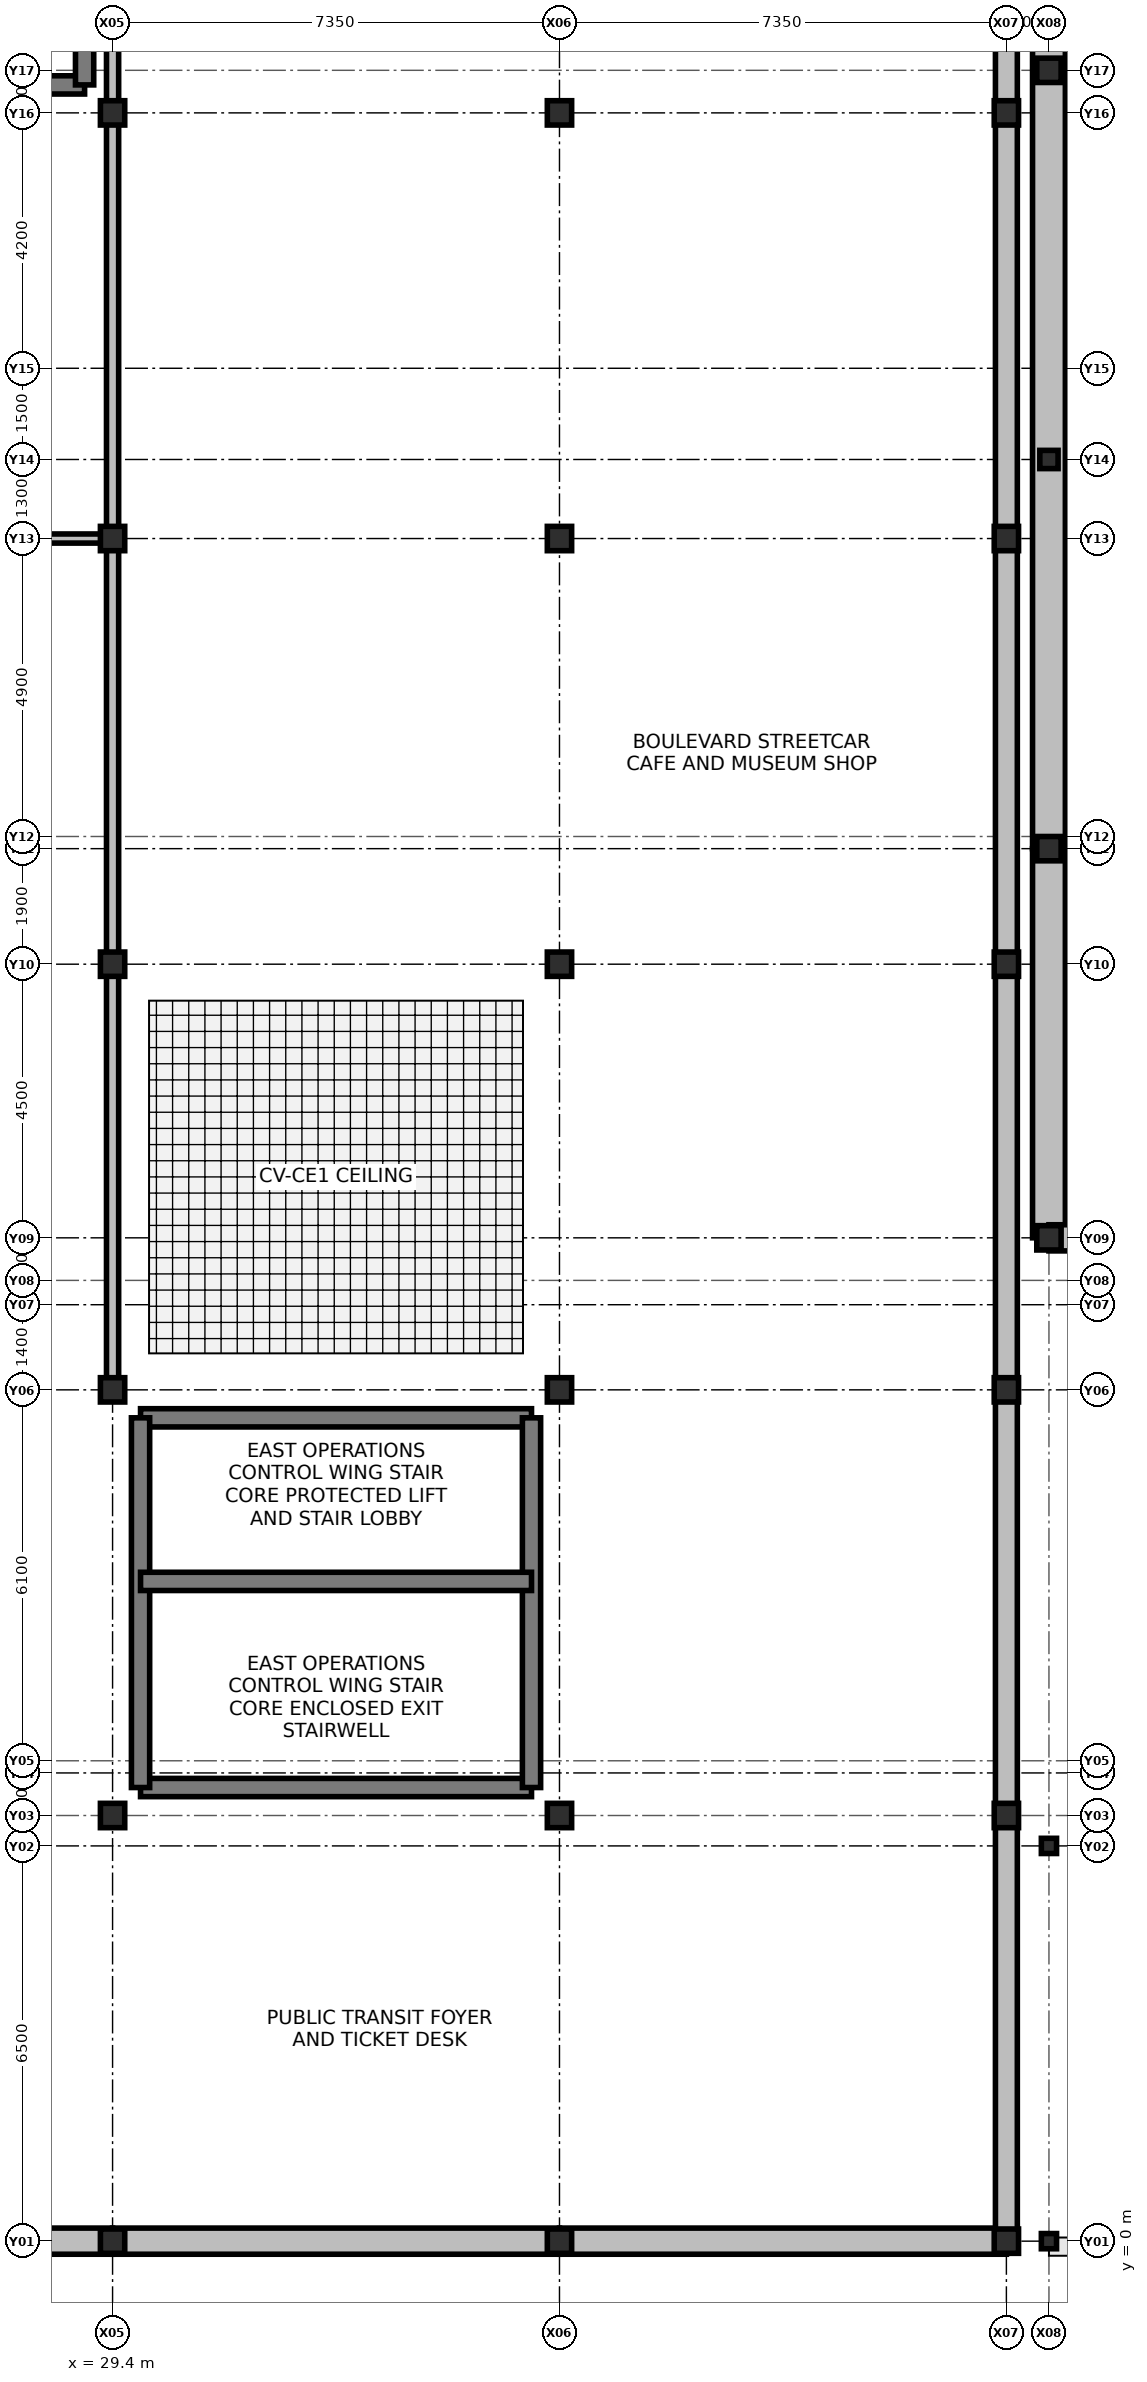
"""IFC4 building model, lengths in metres.
Left out: names, types, materials, properties, quantities, classifications, styles, units other than length and angle.
Written with IfcOpenShell. Run it as: python <this file> out.ifc"""

import sys

from ifc_helpers import new_model, si_unit, direction, frame, frame_2d, origin, origin_2d, place, context, subcontext, project, spatial, rectangle, hollow_rectangle, i_section, extrude, element, fill, save


model = new_model("IFC4")
c1 = context("Model", 3, precision=1e-05, world=origin(), true_north=direction((0.0, 1.0)))
c2 = subcontext(c1, "Body", "Model", "MODEL_VIEW")
j1 = project(units=[si_unit("LENGTHUNIT", "METRE"), si_unit("PLANEANGLEUNIT", "RADIAN")], contexts=[c1])
p1 = place(None, origin())
s1 = spatial("IfcSite", under=j1, at=p1, CompositionType="ELEMENT")
p2 = place(p1, origin())
s2 = spatial("IfcBuilding", under=s1, at=p2, CompositionType="ELEMENT")
p3 = place(p2, origin())
s3 = spatial("IfcBuildingStorey", under=s2, at=p3, CompositionType="ELEMENT", Elevation=0.0)
for number, where, z_axis, x_axis in (
    (1, (44.8, 16.5, -0.35), (0.0, 0.0, 1.0), (1.0, 0.0, 0.0)),
    (2, (44.8, 22.9, -0.35), (0.0, 0.0, 1.0), (1.0, 0.0, 0.0)),
):
    element("IfcColumn", number, at=place(p3, frame(where, z_axis=z_axis, x_axis=x_axis)), inside=s3, PredefinedType="COLUMN", context=c2, shape_type="SweptSolid", body=[
        extrude(i_section(OverallWidth=0.4, OverallDepth=0.4, WebThickness=0.013, FlangeThickness=0.021, at=origin_2d()), origin(), (0.0, 0.0, 1.0), 6.35),
    ])
p4 = place(p3, frame((44.8, 29.3, -0.35), z_axis=(0.0, 0.0, 1.0), x_axis=(1.0, 0.0, 0.0)))
e3 = element("IfcColumn", 3, at=p4, inside=s3, PredefinedType="COLUMN", context=c2, shape_type="SweptSolid", body=[
    extrude(i_section(OverallWidth=0.3, OverallDepth=0.3, WebThickness=0.01, FlangeThickness=0.015, at=origin_2d()), origin(), (0.0, 0.0, 1.0), 6.35),
])
for number, where, z_axis, x_axis in (
    (4, (44.8, 35.7, -0.35), (0.0, 0.0, 1.0), (1.0, 0.0, 0.0)),
    (5, (29.4, 0.0, -0.35), (0.0, 0.0, 1.0), (1.0, 0.0, 0.0)),
    (6, (29.4, 7.0, -0.35), (0.0, 0.0, 1.0), (1.0, 0.0, 0.0)),
    (7, (29.4, 14.0, -0.35), (0.0, 0.0, 1.0), (1.0, 0.0, 0.0)),
    (8, (29.4, 21.0, -0.35), (0.0, 0.0, 1.0), (1.0, 0.0, 0.0)),
    (9, (29.4, 28.0, -0.35), (0.0, 0.0, 1.0), (1.0, 0.0, 0.0)),
    (10, (29.4, 35.0, -0.35), (0.0, 0.0, 1.0), (1.0, 0.0, 0.0)),
    (11, (36.75, 0.0, -0.35), (0.0, 0.0, 1.0), (1.0, 0.0, 0.0)),
    (12, (36.75, 7.0, -0.35), (0.0, 0.0, 1.0), (1.0, 0.0, 0.0)),
    (13, (36.75, 14.0, -0.35), (0.0, 0.0, 1.0), (1.0, 0.0, 0.0)),
    (14, (36.75, 21.0, -0.35), (0.0, 0.0, 1.0), (1.0, 0.0, 0.0)),
    (15, (36.75, 28.0, -0.35), (0.0, 0.0, 1.0), (1.0, 0.0, 0.0)),
    (16, (36.75, 35.0, -0.35), (0.0, 0.0, 1.0), (1.0, 0.0, 0.0)),
    (17, (44.1, 0.0, -0.35), (0.0, 0.0, 1.0), (1.0, 0.0, 0.0)),
    (18, (44.1, 7.0, -0.35), (0.0, 0.0, 1.0), (1.0, 0.0, 0.0)),
    (19, (44.1, 14.0, -0.35), (0.0, 0.0, 1.0), (1.0, 0.0, 0.0)),
    (20, (44.1, 21.0, -0.35), (0.0, 0.0, 1.0), (1.0, 0.0, 0.0)),
    (21, (44.1, 28.0, -0.35), (0.0, 0.0, 1.0), (1.0, 0.0, 0.0)),
    (22, (44.1, 35.0, -0.35), (0.0, 0.0, 1.0), (1.0, 0.0, 0.0)),
):
    element("IfcColumn", number, at=place(p3, frame(where, z_axis=z_axis, x_axis=x_axis)), inside=s3, PredefinedType="COLUMN", context=c2, shape_type="SweptSolid", body=[
        extrude(i_section(OverallWidth=0.4, OverallDepth=0.4, WebThickness=0.013, FlangeThickness=0.021, at=origin_2d()), origin(), (0.0, 0.0, 1.0), 6.35),
    ])
p5 = place(p3, frame((44.8, 0.0, -0.35), z_axis=(0.0, 0.0, 1.0), x_axis=(1.0, 0.0, 0.0)))
e23 = element("IfcColumn", 23, at=p5, inside=s3, PredefinedType="COLUMN", context=c2, shape_type="SweptSolid", body=[
    extrude(hollow_rectangle(XDim=0.25, YDim=0.25, WallThickness=0.009, at=origin_2d()), origin(), (0.0, 0.0, 1.0), 6.125),
])
p6 = place(p3, frame((44.8, 6.5, -0.35), z_axis=(0.0, 0.0, 1.0), x_axis=(1.0, 0.0, 0.0)))
e24 = element("IfcColumn", 24, at=p6, inside=s3, PredefinedType="COLUMN", context=c2, shape_type="SweptSolid", body=[
    extrude(hollow_rectangle(XDim=0.25, YDim=0.25, WallThickness=0.009, at=origin_2d()), origin(), (0.0, 0.0, 1.0), 6.748),
])
p7 = place(p3, frame((44.8, 22.9, 0.0), z_axis=(0.0, 0.0, 1.0), x_axis=(0.0, 1.0, 0.0)))
e25 = element("IfcWall", 25, at=p7, inside=s3, PredefinedType="SOLIDWALL", context=c2, shape_type="SweptSolid", body=[
    extrude(rectangle(XDim=32.0, YDim=0.54, at=frame_2d((16.0, 0.0))), origin(), (0.0, 0.0, 1.0), 5.14),
])
p8 = place(p7, frame((1.3, 0.0, 0.0)))
e26 = element("IfcOpeningElement", 26, at=p8, cuts=e25, PredefinedType="OPENING", context=c2, shape_type="SweptSolid", body=[
    extrude(rectangle(XDim=3.8, YDim=4.4, at=frame_2d((1.9, 2.2))), frame((0.0, 0.28, 0.0), z_axis=(0.0, -1.0, 0.0), x_axis=(1.0, 0.0, 0.0)), (0.0, 0.0, 1.0), 0.56),
])
p9 = place(p7, frame((7.7, 0.0, 0.0)))
e27 = element("IfcOpeningElement", 27, at=p9, cuts=e25, PredefinedType="OPENING", context=c2, shape_type="SweptSolid", body=[
    extrude(rectangle(XDim=3.8, YDim=4.4, at=frame_2d((1.9, 2.2))), frame((0.0, 0.28, 0.0), z_axis=(0.0, -1.0, 0.0), x_axis=(1.0, 0.0, 0.0)), (0.0, 0.0, 1.0), 0.56),
])
p10 = place(p7, frame((14.1, 0.0, 0.0)))
e28 = element("IfcOpeningElement", 28, at=p10, cuts=e25, PredefinedType="OPENING", context=c2, shape_type="SweptSolid", body=[
    extrude(rectangle(XDim=3.8, YDim=4.4, at=frame_2d((1.9, 2.2))), frame((0.0, 0.28, 0.0), z_axis=(0.0, -1.0, 0.0), x_axis=(1.0, 0.0, 0.0)), (0.0, 0.0, 1.0), 0.56),
])
p11 = place(p7, frame((20.5, 0.0, 0.0)))
e29 = element("IfcOpeningElement", 29, at=p11, cuts=e25, PredefinedType="OPENING", context=c2, shape_type="SweptSolid", body=[
    extrude(rectangle(XDim=3.8, YDim=4.4, at=frame_2d((1.9, 2.2))), frame((0.0, 0.28, 0.0), z_axis=(0.0, -1.0, 0.0), x_axis=(1.0, 0.0, 0.0)), (0.0, 0.0, 1.0), 0.56),
])
p12 = place(p7, frame((26.9, 0.0, 0.0)))
e30 = element("IfcOpeningElement", 30, at=p12, cuts=e25, PredefinedType="OPENING", context=c2, shape_type="SweptSolid", body=[
    extrude(rectangle(XDim=3.8, YDim=4.4, at=frame_2d((1.9, 2.2))), frame((0.0, 0.28, 0.0), z_axis=(0.0, -1.0, 0.0), x_axis=(1.0, 0.0, 0.0)), (0.0, 0.0, 1.0), 0.56),
])
p13 = place(p3, frame((44.8, 16.5, 0.0), z_axis=(0.0, 0.0, 1.0), x_axis=(0.0, 1.0, 0.0)))
e31 = element("IfcWall", 31, at=p13, inside=s3, PredefinedType="SOLIDWALL", context=c2, shape_type="SweptSolid", body=[
    extrude(rectangle(XDim=6.4, YDim=0.54, at=frame_2d((3.2, 0.0))), origin(), (0.0, 0.0, 1.0), 5.14),
])
p14 = place(p3, frame((44.8, 16.5, 0.0), z_axis=(0.0, 0.0, 1.0), x_axis=(1.0, 0.0, 0.0)))
e32 = element("IfcWall", 32, at=p14, inside=s3, PredefinedType="SOLIDWALL", context=c2, shape_type="SweptSolid", body=[
    extrude(rectangle(XDim=8.4, YDim=0.43, at=frame_2d((4.2, 0.0))), origin(), (0.0, 0.0, 1.0), 5.14),
])
p15 = place(p14, frame((3.3, 0.0, 0.0)))
e33 = element("IfcOpeningElement", 33, at=p15, cuts=e32, PredefinedType="OPENING", context=c2, shape_type="SweptSolid", body=[
    extrude(rectangle(XDim=1.8, YDim=2.4, at=frame_2d((0.9, 1.2))), frame((0.0, 0.225, 0.0), z_axis=(0.0, -1.0, 0.0), x_axis=(1.0, 0.0, 0.0)), (0.0, 0.0, 1.0), 0.45),
])
p16 = place(p3, frame((22.05, 0.0, 0.0), z_axis=(0.0, 0.0, 1.0), x_axis=(1.0, 0.0, 0.0)))
e34 = element("IfcWall", 34, at=p16, inside=s3, PredefinedType="SOLIDWALL", context=c2, shape_type="SweptSolid", body=[
    extrude(rectangle(XDim=7.35, YDim=0.43, at=frame_2d((3.675, 0.0))), origin(), (0.0, 0.0, 1.0), 5.15),
])
p17 = place(p3, frame((29.4, 0.0, 0.0), z_axis=(0.0, 0.0, 1.0), x_axis=(1.0, 0.0, 0.0)))
e35 = element("IfcWall", 35, at=p17, inside=s3, PredefinedType="SOLIDWALL", context=c2, shape_type="SweptSolid", body=[
    extrude(rectangle(XDim=7.35, YDim=0.43, at=frame_2d((3.675, 0.0))), origin(), (0.0, 0.0, 1.0), 5.15),
])
p18 = place(p17, frame((2.75, 0.0, 0.0)))
e36 = element("IfcOpeningElement", 36, at=p18, cuts=e35, PredefinedType="OPENING", context=c2, shape_type="SweptSolid", body=[
    extrude(rectangle(XDim=1.8, YDim=2.4, at=frame_2d((0.9, 1.2))), frame((0.0, 0.225, 0.0), z_axis=(0.0, -1.0, 0.0), x_axis=(1.0, 0.0, 0.0)), (0.0, 0.0, 1.0), 0.45),
])
p19 = place(p3, frame((36.75, 0.0, 0.0), z_axis=(0.0, 0.0, 1.0), x_axis=(1.0, 0.0, 0.0)))
e37 = element("IfcWall", 37, at=p19, inside=s3, PredefinedType="SOLIDWALL", context=c2, shape_type="SweptSolid", body=[
    extrude(rectangle(XDim=7.35, YDim=0.43, at=frame_2d((3.675, 0.0))), origin(), (0.0, 0.0, 1.0), 5.15),
])
for number, where, z_axis, x_axis in (
    (38, (44.1, 0.0, 0.0), (0.0, 0.0, 1.0), (0.0, 1.0, 0.0)),
    (39, (44.1, 7.0, 0.0), (0.0, 0.0, 1.0), (0.0, 1.0, 0.0)),
    (40, (44.1, 14.0, 0.0), (0.0, 0.0, 1.0), (0.0, 1.0, 0.0)),
    (41, (44.1, 21.0, 0.0), (0.0, 0.0, 1.0), (0.0, 1.0, 0.0)),
    (42, (44.1, 28.0, 0.0), (0.0, 0.0, 1.0), (0.0, 1.0, 0.0)),
    (43, (44.1, 35.0, 0.0), (0.0, 0.0, 1.0), (0.0, 1.0, 0.0)),
):
    element("IfcWall", number, at=place(p3, frame(where, z_axis=z_axis, x_axis=x_axis)), inside=s3, PredefinedType="SOLIDWALL", context=c2, shape_type="SweptSolid", body=[
        extrude(rectangle(XDim=7.0, YDim=0.36, at=frame_2d((3.5, 0.0))), origin(), (0.0, 0.0, 1.0), 1.2),
    ])
p20 = place(p3, frame((22.51, 35.46, -0.35), z_axis=(0.0, 0.0, 1.0), x_axis=(1.0, 0.0, 0.0)))
e44 = element("IfcWall", 44, at=p20, inside=s3, PredefinedType="SHEAR", context=c2, shape_type="SweptSolid", body=[
    extrude(rectangle(XDim=6.43, YDim=0.3, at=frame_2d((3.215, 0.0))), origin(), (0.0, 0.0, 1.0), 6.07),
])
p21 = place(p3, frame((28.94, 35.46, -0.35), z_axis=(0.0, 0.0, 1.0), x_axis=(0.0, 1.0, 0.0)))
e45 = element("IfcWall", 45, at=p21, inside=s3, PredefinedType="SHEAR", context=c2, shape_type="SweptSolid", body=[
    extrude(rectangle(XDim=6.08, YDim=0.3, at=frame_2d((3.04, 0.0))), origin(), (0.0, 0.0, 1.0), 6.07),
])
p22 = place(p3, frame((29.86, 7.46, -0.35), z_axis=(0.0, 0.0, 1.0), x_axis=(1.0, 0.0, 0.0)))
e46 = element("IfcWall", 46, at=p22, inside=s3, PredefinedType="SHEAR", context=c2, shape_type="SweptSolid", body=[
    extrude(rectangle(XDim=6.43, YDim=0.3, at=frame_2d((3.215, 0.0))), origin(), (0.0, 0.0, 1.0), 6.07),
])
p23 = place(p3, frame((29.86, 13.54, -0.35), z_axis=(0.0, 0.0, 1.0), x_axis=(1.0, 0.0, 0.0)))
e47 = element("IfcWall", 47, at=p23, inside=s3, PredefinedType="SHEAR", context=c2, shape_type="SweptSolid", body=[
    extrude(rectangle(XDim=6.43, YDim=0.3, at=frame_2d((3.215, 0.0))), origin(), (0.0, 0.0, 1.0), 6.07),
])
p24 = place(p23, frame((0.55, 0.0, 0.35)))
e48 = element("IfcOpeningElement", 48, at=p24, cuts=e47, PredefinedType="OPENING", context=c2, shape_type="SweptSolid", body=[
    extrude(rectangle(XDim=1.5, YDim=2.2, at=frame_2d((0.75, 1.1))), frame((0.0, 0.16, 0.0), z_axis=(0.0, -1.0, 0.0), x_axis=(1.0, 0.0, 0.0)), (0.0, 0.0, 1.0), 0.32),
])
for number, where, z_axis, x_axis in (
    (49, (29.86, 7.46, -0.35), (0.0, 0.0, 1.0), (0.0, 1.0, 0.0)),
    (50, (36.29, 7.46, -0.35), (0.0, 0.0, 1.0), (0.0, 1.0, 0.0)),
):
    element("IfcWall", number, at=place(p3, frame(where, z_axis=z_axis, x_axis=x_axis)), inside=s3, PredefinedType="SHEAR", context=c2, shape_type="SweptSolid", body=[
        extrude(rectangle(XDim=6.08, YDim=0.3, at=frame_2d((3.04, 0.0))), origin(), (0.0, 0.0, 1.0), 6.07),
    ])
p25 = place(p3, frame((29.86, 10.85, -0.35), z_axis=(0.0, 0.0, 1.0), x_axis=(1.0, 0.0, 0.0)))
e51 = element("IfcWall", 51, at=p25, inside=s3, PredefinedType="SHEAR", context=c2, shape_type="SweptSolid", body=[
    extrude(rectangle(XDim=6.43, YDim=0.3, at=frame_2d((3.215, 0.0))), origin(), (0.0, 0.0, 1.0), 6.07),
])
p26 = place(p25, frame((0.185, 0.0, 0.35)))
e52 = element("IfcOpeningElement", 52, at=p26, cuts=e51, PredefinedType="OPENING", context=c2, shape_type="SweptSolid", body=[
    extrude(rectangle(XDim=1.05, YDim=2.15, at=frame_2d((0.525, 1.075))), frame((0.0, 0.16, 0.0), z_axis=(0.0, -1.0, 0.0), x_axis=(1.0, 0.0, 0.0)), (0.0, 0.0, 1.0), 0.32),
])
p27 = place(p3, frame((29.4, 14.0, 0.0), z_axis=(0.0, 0.0, 1.0), x_axis=(0.0, 1.0, 0.0)))
e53 = element("IfcWall", 53, at=p27, inside=s3, PredefinedType="PARTITIONING", context=c2, shape_type="SweptSolid", body=[
    extrude(rectangle(XDim=49.0, YDim=0.2, at=frame_2d((24.5, 0.0))), origin(), (0.0, 0.0, 1.0), 4.35),
])
p28 = place(p27, frame((8.0, 0.0, 0.0)))
e54 = element("IfcOpeningElement", 54, at=p28, cuts=e53, PredefinedType="OPENING", context=c2, shape_type="SweptSolid", body=[
    extrude(rectangle(XDim=1.35, YDim=2.2, at=frame_2d((0.675, 1.1))), frame((0.0, 0.11, 0.0), z_axis=(0.0, -1.0, 0.0), x_axis=(1.0, 0.0, 0.0)), (0.0, 0.0, 1.0), 0.22),
])
p29 = place(p27, frame((17.2, 0.0, 0.0)))
e55 = element("IfcOpeningElement", 55, at=p29, cuts=e53, PredefinedType="OPENING", context=c2, shape_type="SweptSolid", body=[
    extrude(rectangle(XDim=1.4, YDim=2.2, at=frame_2d((0.7, 1.1))), frame((0.0, 0.11, 0.0), z_axis=(0.0, -1.0, 0.0), x_axis=(1.0, 0.0, 0.0)), (0.0, 0.0, 1.0), 0.22),
])
p30 = place(p27, frame((31.0, 0.0, 0.0)))
e56 = element("IfcOpeningElement", 56, at=p30, cuts=e53, PredefinedType="OPENING", context=c2, shape_type="SweptSolid", body=[
    extrude(rectangle(XDim=1.4, YDim=2.2, at=frame_2d((0.7, 1.1))), frame((0.0, 0.11, 0.0), z_axis=(0.0, -1.0, 0.0), x_axis=(1.0, 0.0, 0.0)), (0.0, 0.0, 1.0), 0.22),
])
p31 = place(p3, frame((7.35, 28.0, 0.0), z_axis=(0.0, 0.0, 1.0), x_axis=(1.0, 0.0, 0.0)))
e57 = element("IfcWall", 57, at=p31, inside=s3, PredefinedType="PARTITIONING", context=c2, shape_type="SweptSolid", body=[
    extrude(rectangle(XDim=22.05, YDim=0.15, at=frame_2d((11.025, 0.0))), origin(), (0.0, 0.0, 1.0), 4.35),
])
p32 = place(p31, frame((10.2, 0.0, 0.0)))
e58 = element("IfcOpeningElement", 58, at=p32, cuts=e57, PredefinedType="OPENING", context=c2, shape_type="SweptSolid", body=[
    extrude(rectangle(XDim=1.7, YDim=2.25, at=frame_2d((0.85, 1.125))), frame((0.0, 0.085, 0.0), z_axis=(0.0, -1.0, 0.0), x_axis=(1.0, 0.0, 0.0)), (0.0, 0.0, 1.0), 0.17),
])
p33 = place(p8, origin())
e59 = element("IfcDoor", 59, at=p33, inside=s3, OperationType="ROLLINGUP", PredefinedType="DOOR", context=c2, shape_type="SweptSolid", body=[
    extrude(rectangle(XDim=3.8, YDim=4.4, at=frame_2d((1.9, 2.2))), frame((0.0, 0.025, 0.0), z_axis=(0.0, -1.0, 0.0), x_axis=(1.0, 0.0, 0.0)), (0.0, 0.0, 1.0), 0.05),
])
fill(e26, e59)
p34 = place(p9, origin())
e60 = element("IfcDoor", 60, at=p34, inside=s3, OperationType="ROLLINGUP", PredefinedType="DOOR", context=c2, shape_type="SweptSolid", body=[
    extrude(rectangle(XDim=3.8, YDim=4.4, at=frame_2d((1.9, 2.2))), frame((0.0, 0.025, 0.0), z_axis=(0.0, -1.0, 0.0), x_axis=(1.0, 0.0, 0.0)), (0.0, 0.0, 1.0), 0.05),
])
fill(e27, e60)
p35 = place(p18, frame((1.8, 0.0, 0.0), z_axis=(0.0, 0.0, 1.0), x_axis=(-1.0, 0.0, 0.0)))
e61 = element("IfcDoor", 61, at=p35, inside=s3, OperationType="DOUBLE_DOOR_SINGLE_SWING", PredefinedType="DOOR", context=c2, shape_type="SweptSolid", body=[
    extrude(rectangle(XDim=1.8, YDim=2.4, at=frame_2d((0.9, 1.2))), frame((0.0, 0.025, 0.0), z_axis=(0.0, -1.0, 0.0), x_axis=(1.0, 0.0, 0.0)), (0.0, 0.0, 1.0), 0.05),
])
fill(e36, e61)
p36 = place(p26, origin())
e62 = element("IfcDoor", 62, at=p36, inside=s3, OperationType="SINGLE_SWING_RIGHT", PredefinedType="DOOR", context=c2, shape_type="SweptSolid", body=[
    extrude(rectangle(XDim=1.05, YDim=2.15, at=frame_2d((0.525, 1.075))), frame((0.0, 0.025, 0.0), z_axis=(0.0, -1.0, 0.0), x_axis=(1.0, 0.0, 0.0)), (0.0, 0.0, 1.0), 0.05),
])
fill(e52, e62)
p37 = place(p24, origin())
e63 = element("IfcDoor", 63, at=p37, inside=s3, OperationType="DOUBLE_DOOR_SINGLE_SWING", PredefinedType="DOOR", context=c2, shape_type="SweptSolid", body=[
    extrude(rectangle(XDim=1.5, YDim=2.2, at=frame_2d((0.75, 1.1))), frame((0.0, 0.025, 0.0), z_axis=(0.0, -1.0, 0.0), x_axis=(1.0, 0.0, 0.0)), (0.0, 0.0, 1.0), 0.05),
])
fill(e48, e63)
p38 = place(p28, origin())
e64 = element("IfcDoor", 64, at=p38, inside=s3, OperationType="DOUBLE_DOOR_SINGLE_SWING", PredefinedType="DOOR", context=c2, shape_type="SweptSolid", body=[
    extrude(rectangle(XDim=1.35, YDim=2.2, at=frame_2d((0.675, 1.1))), frame((0.0, 0.025, 0.0), z_axis=(0.0, -1.0, 0.0), x_axis=(1.0, 0.0, 0.0)), (0.0, 0.0, 1.0), 0.05),
])
fill(e54, e64)
p39 = place(p29, origin())
e65 = element("IfcDoor", 65, at=p39, inside=s3, OperationType="DOUBLE_DOOR_SINGLE_SWING", PredefinedType="DOOR", context=c2, shape_type="SweptSolid", body=[
    extrude(rectangle(XDim=1.4, YDim=2.2, at=frame_2d((0.7, 1.1))), frame((0.0, 0.025, 0.0), z_axis=(0.0, -1.0, 0.0), x_axis=(1.0, 0.0, 0.0)), (0.0, 0.0, 1.0), 0.05),
])
fill(e55, e65)
save(model, sys.argv[1])
